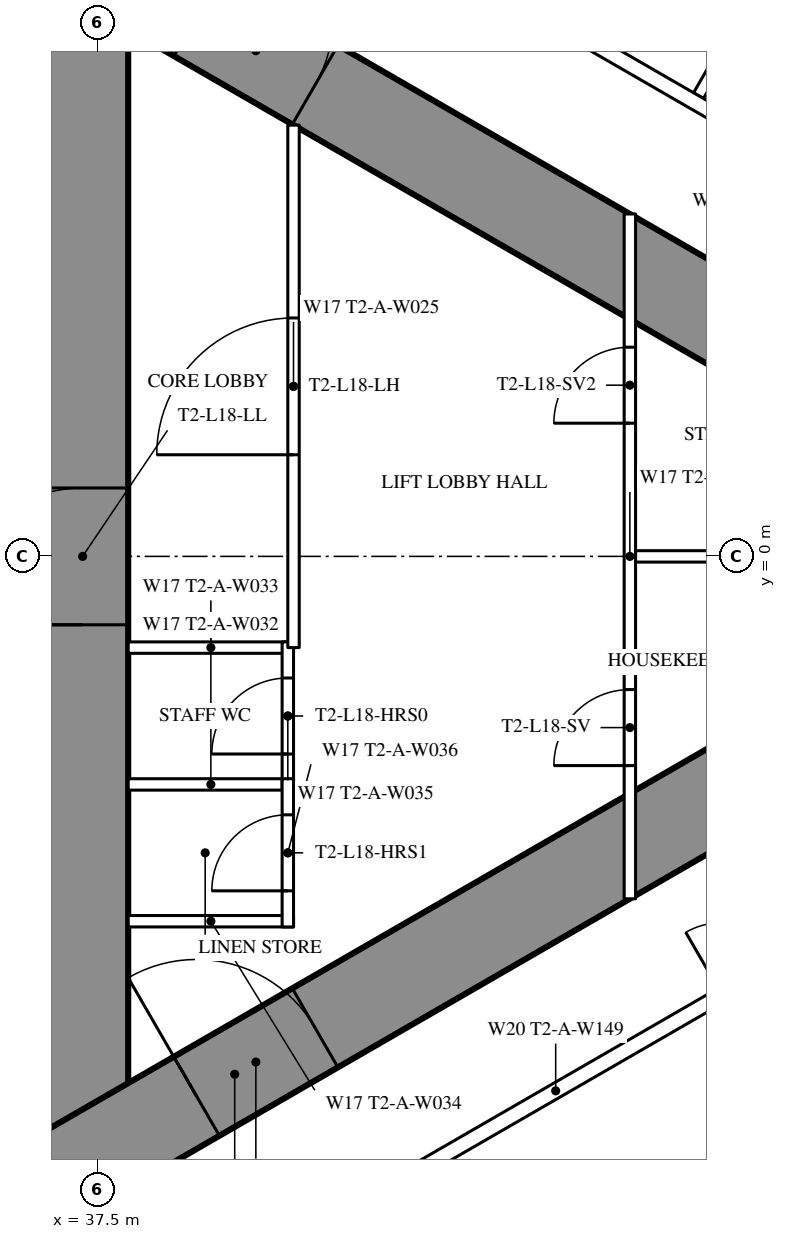
"""IFC4 building model, lengths in metres.
Left out: names, types, materials, properties, quantities, classifications, styles, units other than length and angle.
Written with IfcOpenShell. Run it as: python <this file> out.ifc"""

import sys

from ifc_helpers import new_model, si_unit, direction, frame, frame_2d, origin, place, context, subcontext, project, spatial, rectangle, extrude, element, fill, save


model = new_model("IFC4")
c1 = context("Model", 3, precision=1e-05, world=origin(), true_north=direction((0.0, 1.0)))
c2 = subcontext(c1, "Body", "Model", "MODEL_VIEW")
j1 = project(units=[si_unit("LENGTHUNIT", "METRE"), si_unit("PLANEANGLEUNIT", "RADIAN")], contexts=[c1])
p1 = place(None, origin())
s1 = spatial("IfcSite", under=j1, at=p1, CompositionType="ELEMENT")
p2 = place(p1, origin())
s2 = spatial("IfcBuilding", under=s1, at=p2, CompositionType="ELEMENT")
p3 = place(p2, frame((0.0, 0.0, 70.5)))
s3 = spatial("IfcBuildingStorey", under=s2, at=p3, CompositionType="ELEMENT", Elevation=70.5)
p4 = place(p3, frame((37.3, -8.6, 0.0), z_axis=(0.0, 0.0, 1.0), x_axis=(0.0, 1.0, 0.0)))
e1 = element("IfcWall", 1, at=p4, inside=s3, PredefinedType="SHEAR", context=c2, shape_type="SweptSolid", body=[
    extrude(rectangle(XDim=17.2, YDim=1.2, at=frame_2d((8.6, 0.0))), origin(), (0.0, 0.0, 1.0), 3.5),
])
p5 = place(p4, frame((7.7, 0.0, 0.0)))
e2 = element("IfcOpeningElement", 2, at=p5, cuts=e1, PredefinedType="OPENING", context=c2, shape_type="SweptSolid", body=[
    extrude(rectangle(XDim=1.8, YDim=2.2, at=frame_2d((0.9, 1.1))), frame((0.0, 0.61, 0.0), z_axis=(0.0, -1.0, 0.0), x_axis=(1.0, 0.0, 0.0)), (0.0, 0.0, 1.0), 1.22),
])
p6 = place(p3, frame((27.2, -13.8, 0.0), z_axis=(0.0, 0.0, 1.0), x_axis=(0.866027159892, 0.499996958321, 0.0)))
e3 = element("IfcWall", 3, at=p6, inside=s3, PredefinedType="SHEAR", context=c2, shape_type="SweptSolid", body=[
    extrude(rectangle(XDim=27.947, YDim=1.2, at=frame_2d((13.973, 0.0))), origin(), (0.0, 0.0, 1.0), 3.5),
])
p7 = place(p6, frame((4.6, 0.0, 0.0)))
e4 = element("IfcOpeningElement", 4, at=p7, cuts=e3, PredefinedType="OPENING", context=c2, shape_type="SweptSolid", body=[
    extrude(rectangle(XDim=1.0, YDim=2.2, at=frame_2d((0.5, 1.1))), frame((0.0, 0.61, 0.0), z_axis=(0.0, -1.0, 0.0), x_axis=(1.0, 0.0, 0.0)), (0.0, 0.0, 1.0), 1.22),
])
p8 = place(p6, frame((13.395, 0.0, 0.0)))
e5 = element("IfcOpeningElement", 5, at=p8, cuts=e3, PredefinedType="OPENING", context=c2, shape_type="SweptSolid", body=[
    extrude(rectangle(XDim=1.8, YDim=2.2, at=frame_2d((0.9, 1.1))), frame((0.0, 0.61, 0.0), z_axis=(0.0, -1.0, 0.0), x_axis=(1.0, 0.0, 0.0)), (0.0, 0.0, 1.0), 1.22),
])
p9 = place(p3, frame((27.2, 13.8, 0.0), z_axis=(0.0, 0.0, 1.0), x_axis=(0.866024515034, -0.500001539357, 0.0)))
e6 = element("IfcWall", 6, at=p9, inside=s3, PredefinedType="SHEAR", context=c2, shape_type="SweptSolid", body=[
    extrude(rectangle(XDim=26.907, YDim=1.2, at=frame_2d((13.454, 0.0))), origin(), (0.0, 0.0, 1.0), 3.5),
])
p10 = place(p9, frame((4.6, 0.0, 0.0)))
e7 = element("IfcOpeningElement", 7, at=p10, cuts=e6, PredefinedType="OPENING", context=c2, shape_type="SweptSolid", body=[
    extrude(rectangle(XDim=1.0, YDim=2.2, at=frame_2d((0.5, 1.1))), frame((0.0, 0.61, 0.0), z_axis=(0.0, -1.0, 0.0), x_axis=(1.0, 0.0, 0.0)), (0.0, 0.0, 1.0), 1.22),
])
p11 = place(p9, frame((13.395, 0.0, 0.0)))
e8 = element("IfcOpeningElement", 8, at=p11, cuts=e6, PredefinedType="OPENING", context=c2, shape_type="SweptSolid", body=[
    extrude(rectangle(XDim=1.8, YDim=2.2, at=frame_2d((0.9, 1.1))), frame((0.0, 0.61, 0.0), z_axis=(0.0, -1.0, 0.0), x_axis=(1.0, 0.0, 0.0)), (0.0, 0.0, 1.0), 1.22),
])
p12 = place(p3, frame((45.403, 6.062, 0.0), z_axis=(0.0, 0.0, 1.0), x_axis=(0.500013434677, 0.866017647131, 0.0)))
e9 = element("IfcWall", 9, at=p12, inside=s3, PredefinedType="PARTITIONING", context=c2, shape_type="SweptSolid", body=[
    extrude(rectangle(XDim=9.902, YDim=0.15, at=frame_2d((4.951, 0.0))), origin(), (0.0, 0.0, 1.0), 2.25),
])
p13 = place(p3, frame((36.834, 10.894, 0.0), z_axis=(0.0, 0.0, 1.0), x_axis=(0.866028157229, -0.499995230863, 0.0)))
e10 = element("IfcWall", 10, at=p13, inside=s3, PredefinedType="PARTITIONING", context=c2, shape_type="SweptSolid", body=[
    extrude(rectangle(XDim=21.667, YDim=0.2, at=frame_2d((10.833, 0.0))), origin(), (0.0, 0.0, 1.0), 3.25),
])
p14 = place(p13, frame((18.885, 0.0, 0.0)))
e11 = element("IfcOpeningElement", 11, at=p14, cuts=e10, PredefinedType="OPENING", context=c2, shape_type="SweptSolid", body=[
    extrude(rectangle(XDim=0.95, YDim=2.2, at=frame_2d((0.475, 1.1))), frame((0.0, 0.11, 0.0), z_axis=(0.0, -1.0, 0.0), x_axis=(1.0, 0.0, 0.0)), (0.0, 0.0, 1.0), 0.22),
])
p15 = place(p13, frame((15.443, 0.0, 0.0)))
e12 = element("IfcOpeningElement", 12, at=p15, cuts=e10, PredefinedType="OPENING", context=c2, shape_type="SweptSolid", body=[
    extrude(rectangle(XDim=1.8, YDim=2.2, at=frame_2d((0.9, 1.1))), frame((0.0, 0.11, 0.0), z_axis=(0.0, -1.0, 0.0), x_axis=(1.0, 0.0, 0.0)), (0.0, 0.0, 1.0), 0.22),
])
p16 = place(p13, frame((12.562, 0.0, 0.0)))
e13 = element("IfcOpeningElement", 13, at=p16, cuts=e10, PredefinedType="OPENING", context=c2, shape_type="SweptSolid", body=[
    extrude(rectangle(XDim=0.95, YDim=2.2, at=frame_2d((0.475, 1.1))), frame((0.0, 0.11, 0.0), z_axis=(0.0, -1.0, 0.0), x_axis=(1.0, 0.0, 0.0)), (0.0, 0.0, 1.0), 0.22),
])
p17 = place(p13, frame((4.292, 0.0, 0.0)))
e14 = element("IfcOpeningElement", 14, at=p17, cuts=e10, PredefinedType="OPENING", context=c2, shape_type="SweptSolid", body=[
    extrude(rectangle(XDim=1.0, YDim=2.2, at=frame_2d((0.5, 1.1))), frame((0.0, 0.11, 0.0), z_axis=(0.0, -1.0, 0.0), x_axis=(1.0, 0.0, 0.0)), (0.0, 0.0, 1.0), 0.22),
])
p18 = place(p3, frame((37.96, -10.243, 0.0), z_axis=(0.0, 0.0, 1.0), x_axis=(0.866030548046, 0.499991089772, 0.0)))
e15 = element("IfcWall", 15, at=p18, inside=s3, PredefinedType="PARTITIONING", context=c2, shape_type="SweptSolid", body=[
    extrude(rectangle(XDim=12.849, YDim=0.2, at=frame_2d((6.425, 0.0))), origin(), (0.0, 0.0, 1.0), 3.25),
])
p19 = place(p18, frame((8.949, 0.0, 0.0)))
e16 = element("IfcOpeningElement", 16, at=p19, cuts=e15, PredefinedType="OPENING", context=c2, shape_type="SweptSolid", body=[
    extrude(rectangle(XDim=0.95, YDim=2.2, at=frame_2d((0.475, 1.1))), frame((0.0, 0.11, 0.0), z_axis=(0.0, -1.0, 0.0), x_axis=(1.0, 0.0, 0.0)), (0.0, 0.0, 1.0), 0.22),
])
p20 = place(p18, frame((0.6, 0.0, 0.0)))
e17 = element("IfcOpeningElement", 17, at=p20, cuts=e15, PredefinedType="OPENING", context=c2, shape_type="SweptSolid", body=[
    extrude(rectangle(XDim=0.95, YDim=2.2, at=frame_2d((0.475, 1.1))), frame((0.0, 0.11, 0.0), z_axis=(0.0, -1.0, 0.0), x_axis=(1.0, 0.0, 0.0)), (0.0, 0.0, 1.0), 0.22),
])
for number, where, z_axis, x_axis in (
    (18, (37.9, -1.2, 0.0), (0.0, 0.0, 1.0), (1.0, 0.0, 0.0)),
    (19, (37.9, -3.0, 0.0), (0.0, 0.0, 1.0), (1.0, 0.0, 0.0)),
    (20, (37.9, -4.8, 0.0), (0.0, 0.0, 1.0), (1.0, 0.0, 0.0)),
):
    element("IfcWall", number, at=place(p3, frame(where, z_axis=z_axis, x_axis=x_axis)), inside=s3, PredefinedType="PARTITIONING", context=c2, shape_type="SweptSolid", body=[
        extrude(rectangle(XDim=2.175, YDim=0.15, at=frame_2d((1.087, 0.0))), origin(), (0.0, 0.0, 1.0), 3.25),
    ])
p21 = place(p3, frame((40.0, -3.075, 0.0), z_axis=(0.0, 0.0, 1.0), x_axis=(0.0, 1.0, 0.0)))
e21 = element("IfcWall", 21, at=p21, inside=s3, PredefinedType="PARTITIONING", context=c2, shape_type="SweptSolid", body=[
    extrude(rectangle(XDim=1.95, YDim=0.15, at=frame_2d((0.975, 0.0))), origin(), (0.0, 0.0, 1.0), 3.25),
])
p22 = place(p21, frame((0.475, 0.0, 0.0)))
e22 = element("IfcOpeningElement", 22, at=p22, cuts=e21, PredefinedType="OPENING", context=c2, shape_type="SweptSolid", body=[
    extrude(rectangle(XDim=1.0, YDim=2.2, at=frame_2d((0.5, 1.1))), frame((0.0, 0.085, 0.0), z_axis=(0.0, -1.0, 0.0), x_axis=(1.0, 0.0, 0.0)), (0.0, 0.0, 1.0), 0.17),
])
p23 = place(p3, frame((40.0, -4.875, 0.0), z_axis=(0.0, 0.0, 1.0), x_axis=(0.0, 1.0, 0.0)))
e23 = element("IfcWall", 23, at=p23, inside=s3, PredefinedType="PARTITIONING", context=c2, shape_type="SweptSolid", body=[
    extrude(rectangle(XDim=1.95, YDim=0.15, at=frame_2d((0.975, 0.0))), origin(), (0.0, 0.0, 1.0), 3.25),
])
p24 = place(p23, frame((0.475, 0.0, 0.0)))
e24 = element("IfcOpeningElement", 24, at=p24, cuts=e23, PredefinedType="OPENING", context=c2, shape_type="SweptSolid", body=[
    extrude(rectangle(XDim=1.0, YDim=2.2, at=frame_2d((0.5, 1.1))), frame((0.0, 0.085, 0.0), z_axis=(0.0, -1.0, 0.0), x_axis=(1.0, 0.0, 0.0)), (0.0, 0.0, 1.0), 0.17),
])
p25 = place(p3, frame((40.075, -1.2, 0.0), z_axis=(0.0, 0.0, 1.0), x_axis=(0.0, 1.0, 0.0)))
e25 = element("IfcWall", 25, at=p25, inside=s3, PredefinedType="PARTITIONING", context=c2, shape_type="SweptSolid", body=[
    extrude(rectangle(XDim=6.874, YDim=0.15, at=frame_2d((3.437, 0.0))), origin(), (0.0, 0.0, 1.0), 3.25),
])
p26 = place(p25, frame((2.537, 0.0, 0.0)))
e26 = element("IfcOpeningElement", 26, at=p26, cuts=e25, PredefinedType="OPENING", context=c2, shape_type="SweptSolid", body=[
    extrude(rectangle(XDim=1.8, YDim=2.2, at=frame_2d((0.9, 1.1))), frame((0.0, 0.085, 0.0), z_axis=(0.0, -1.0, 0.0), x_axis=(1.0, 0.0, 0.0)), (0.0, 0.0, 1.0), 0.17),
])
p27 = place(p3, frame((44.5, -4.505, 0.0), z_axis=(0.0, 0.0, 1.0), x_axis=(0.0, 1.0, 0.0)))
e27 = element("IfcWall", 27, at=p27, inside=s3, PredefinedType="PARTITIONING", context=c2, shape_type="SweptSolid", body=[
    extrude(rectangle(XDim=9.009, YDim=0.15, at=frame_2d((4.505, 0.0))), origin(), (0.0, 0.0, 1.0), 2.45),
])
p28 = place(p27, frame((1.752, 0.0, 0.0)))
e28 = element("IfcOpeningElement", 28, at=p28, cuts=e27, PredefinedType="OPENING", context=c2, shape_type="SweptSolid", body=[
    extrude(rectangle(XDim=1.0, YDim=2.2, at=frame_2d((0.5, 1.1))), frame((0.0, 0.085, 0.0), z_axis=(0.0, -1.0, 0.0), x_axis=(1.0, 0.0, 0.0)), (0.0, 0.0, 1.0), 0.17),
])
p29 = place(p27, frame((6.257, 0.0, 0.0)))
e29 = element("IfcOpeningElement", 29, at=p29, cuts=e27, PredefinedType="OPENING", context=c2, shape_type="SweptSolid", body=[
    extrude(rectangle(XDim=1.0, YDim=2.2, at=frame_2d((0.5, 1.1))), frame((0.0, 0.085, 0.0), z_axis=(0.0, -1.0, 0.0), x_axis=(1.0, 0.0, 0.0)), (0.0, 0.0, 1.0), 0.17),
])
p30 = place(p3, frame((44.575, 0.0, 0.0), z_axis=(0.0, 0.0, 1.0), x_axis=(1.0, 0.0, 0.0)))
e30 = element("IfcWall", 30, at=p30, inside=s3, PredefinedType="PARTITIONING", context=c2, shape_type="SweptSolid", body=[
    extrude(rectangle(XDim=7.727, YDim=0.15, at=frame_2d((3.864, 0.0))), origin(), (0.0, 0.0, 1.0), 2.25),
])
p31 = place(p22, origin())
e31 = element("IfcDoor", 31, at=p31, inside=s3, OperationType="SINGLE_SWING_LEFT", PredefinedType="DOOR", context=c2, shape_type="SweptSolid", body=[
    extrude(rectangle(XDim=1.0, YDim=2.2, at=frame_2d((0.5, 1.1))), frame((0.0, 0.025, 0.0), z_axis=(0.0, -1.0, 0.0), x_axis=(1.0, 0.0, 0.0)), (0.0, 0.0, 1.0), 0.05),
])
fill(e22, e31)
p32 = place(p24, origin())
e32 = element("IfcDoor", 32, at=p32, inside=s3, OperationType="SINGLE_SWING_LEFT", PredefinedType="DOOR", context=c2, shape_type="SweptSolid", body=[
    extrude(rectangle(XDim=1.0, YDim=2.2, at=frame_2d((0.5, 1.1))), frame((0.0, 0.025, 0.0), z_axis=(0.0, -1.0, 0.0), x_axis=(1.0, 0.0, 0.0)), (0.0, 0.0, 1.0), 0.05),
])
fill(e24, e32)
p33 = place(p26, origin())
e33 = element("IfcDoor", 33, at=p33, inside=s3, OperationType="DOUBLE_DOOR_SINGLE_SWING", PredefinedType="DOOR", context=c2, shape_type="SweptSolid", body=[
    extrude(rectangle(XDim=1.8, YDim=2.2, at=frame_2d((0.9, 1.1))), frame((0.0, 0.025, 0.0), z_axis=(0.0, -1.0, 0.0), x_axis=(1.0, 0.0, 0.0)), (0.0, 0.0, 1.0), 0.05),
])
fill(e26, e33)
p34 = place(p28, origin())
e34 = element("IfcDoor", 34, at=p34, inside=s3, OperationType="SINGLE_SWING_LEFT", PredefinedType="DOOR", context=c2, shape_type="SweptSolid", body=[
    extrude(rectangle(XDim=1.0, YDim=2.2, at=frame_2d((0.5, 1.1))), frame((0.0, 0.025, 0.0), z_axis=(0.0, -1.0, 0.0), x_axis=(1.0, 0.0, 0.0)), (0.0, 0.0, 1.0), 0.05),
])
fill(e28, e34)
p35 = place(p29, origin())
e35 = element("IfcDoor", 35, at=p35, inside=s3, OperationType="SINGLE_SWING_LEFT", PredefinedType="DOOR", context=c2, shape_type="SweptSolid", body=[
    extrude(rectangle(XDim=1.0, YDim=2.2, at=frame_2d((0.5, 1.1))), frame((0.0, 0.025, 0.0), z_axis=(0.0, -1.0, 0.0), x_axis=(1.0, 0.0, 0.0)), (0.0, 0.0, 1.0), 0.05),
])
fill(e29, e35)
p36 = place(p8, origin())
e36 = element("IfcDoor", 36, at=p36, inside=s3, OperationType="DOUBLE_DOOR_SINGLE_SWING", PredefinedType="DOOR", context=c2, shape_type="SweptSolid", body=[
    extrude(rectangle(XDim=1.8, YDim=2.2, at=frame_2d((0.9, 1.1))), frame((0.0, 0.025, 0.0), z_axis=(0.0, -1.0, 0.0), x_axis=(1.0, 0.0, 0.0)), (0.0, 0.0, 1.0), 0.05),
])
fill(e5, e36)
p37 = place(p11, origin())
e37 = element("IfcDoor", 37, at=p37, inside=s3, OperationType="DOUBLE_DOOR_SINGLE_SWING", PredefinedType="DOOR", context=c2, shape_type="SweptSolid", body=[
    extrude(rectangle(XDim=1.8, YDim=2.2, at=frame_2d((0.9, 1.1))), frame((0.0, 0.025, 0.0), z_axis=(0.0, -1.0, 0.0), x_axis=(1.0, 0.0, 0.0)), (0.0, 0.0, 1.0), 0.05),
])
fill(e8, e37)
p38 = place(p5, origin())
e38 = element("IfcDoor", 38, at=p38, inside=s3, OperationType="DOUBLE_DOOR_SINGLE_SWING", PredefinedType="DOOR", context=c2, shape_type="SweptSolid", body=[
    extrude(rectangle(XDim=1.8, YDim=2.2, at=frame_2d((0.9, 1.1))), frame((0.0, 0.025, 0.0), z_axis=(0.0, -1.0, 0.0), x_axis=(1.0, 0.0, 0.0)), (0.0, 0.0, 1.0), 0.05),
])
fill(e2, e38)
save(model, sys.argv[1])
